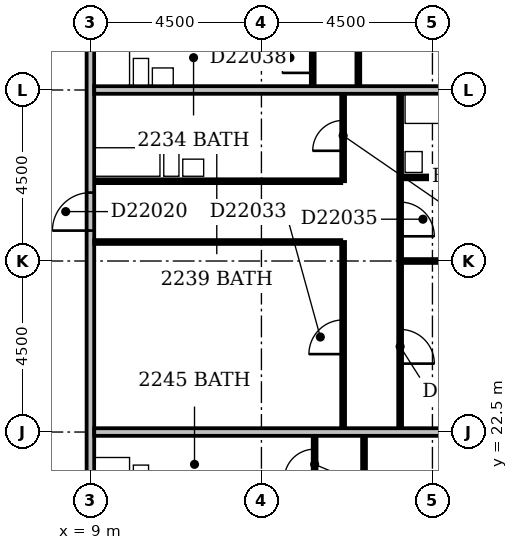
"""IFC4 building model, lengths in metres.
Left out: names, types, materials, properties, quantities, classifications, styles, units other than length and angle.
Written with IfcOpenShell. Run it as: python <this file> out.ifc"""

import sys

from ifc_helpers import new_model, si_unit, direction, frame, frame_2d, origin, place, context, subcontext, project, spatial, rectangle, extrude, element, fill, save


model = new_model("IFC4")
c1 = context("Model", 3, precision=1e-05, world=origin(), true_north=direction((0.0, 1.0)))
c2 = subcontext(c1, "Body", "Model", "MODEL_VIEW")
j1 = project(units=[si_unit("LENGTHUNIT", "METRE"), si_unit("PLANEANGLEUNIT", "RADIAN")], contexts=[c1])
p1 = place(None, origin())
s1 = spatial("IfcSite", under=j1, at=p1, CompositionType="ELEMENT")
p2 = place(p1, origin())
s2 = spatial("IfcBuilding", under=s1, at=p2, CompositionType="ELEMENT")
p3 = place(p2, frame((0.0, 0.0, 90.2)))
s3 = spatial("IfcBuildingStorey", under=s2, at=p3, CompositionType="ELEMENT", Elevation=90.2)
p4 = place(p3, frame((9.0, 5.0, 0.0), z_axis=(0.0, 0.0, 1.0), x_axis=(0.0, 1.0, 0.0)))
e1 = element("IfcWall", 1, at=p4, inside=s3, PredefinedType="PARTITIONING", context=c2, shape_type="SweptSolid", body=[
    extrude(rectangle(XDim=44.5, YDim=0.2, at=frame_2d((22.25, 0.0))), origin(), (0.0, 0.0, 1.0), 3.3),
])
p5 = place(p4, frame((28.45, 0.0, 0.0)))
e2 = element("IfcOpeningElement", 2, at=p5, cuts=e1, PredefinedType="OPENING", context=c2, shape_type="SweptSolid", body=[
    extrude(rectangle(XDim=1.0, YDim=2.1, at=frame_2d((0.5, 1.05))), frame((0.0, 0.112, 0.0), z_axis=(0.0, -1.0, 0.0), x_axis=(1.0, 0.0, 0.0)), (0.0, 0.0, 1.0), 0.224),
])
p6 = place(p4, frame((22.8, 0.0, 0.0)))
e3 = element("IfcOpeningElement", 3, at=p6, cuts=e1, PredefinedType="OPENING", context=c2, shape_type="SweptSolid", body=[
    extrude(rectangle(XDim=1.0, YDim=2.1, at=frame_2d((0.5, 1.05))), frame((0.0, 0.112, 0.0), z_axis=(0.0, -1.0, 0.0), x_axis=(1.0, 0.0, 0.0)), (0.0, 0.0, 1.0), 0.224),
])
p7 = place(p4, frame((14.55, 0.0, 0.0)))
e4 = element("IfcOpeningElement", 4, at=p7, cuts=e1, PredefinedType="OPENING", context=c2, shape_type="SweptSolid", body=[
    extrude(rectangle(XDim=1.0, YDim=2.1, at=frame_2d((0.5, 1.05))), frame((0.0, 0.112, 0.0), z_axis=(0.0, -1.0, 0.0), x_axis=(1.0, 0.0, 0.0)), (0.0, 0.0, 1.0), 0.224),
])
p8 = place(p4, frame((9.3, 0.0, 0.0)))
e5 = element("IfcOpeningElement", 5, at=p8, cuts=e1, PredefinedType="OPENING", context=c2, shape_type="SweptSolid", body=[
    extrude(rectangle(XDim=1.0, YDim=2.1, at=frame_2d((0.5, 1.05))), frame((0.0, 0.112, 0.0), z_axis=(0.0, -1.0, 0.0), x_axis=(1.0, 0.0, 0.0)), (0.0, 0.0, 1.0), 0.224),
])
p9 = place(p4, frame((35.0, 0.0, 0.0)))
e6 = element("IfcOpeningElement", 6, at=p9, cuts=e1, PredefinedType="OPENING", context=c2, shape_type="SweptSolid", body=[
    extrude(rectangle(XDim=0.9, YDim=2.1, at=frame_2d((0.45, 1.05))), frame((0.0, 0.112, 0.0), z_axis=(0.0, -1.0, 0.0), x_axis=(1.0, 0.0, 0.0)), (0.0, 0.0, 1.0), 0.224),
])
p10 = place(p4, frame((1.5, 0.0, 0.0)))
e7 = element("IfcOpeningElement", 7, at=p10, cuts=e1, PredefinedType="OPENING", context=c2, shape_type="SweptSolid", body=[
    extrude(rectangle(XDim=0.9, YDim=2.1, at=frame_2d((0.45, 1.05))), frame((0.0, 0.112, 0.0), z_axis=(0.0, -1.0, 0.0), x_axis=(1.0, 0.0, 0.0)), (0.0, 0.0, 1.0), 0.224),
])
p11 = place(p3, frame((16.2, 18.1, 0.0), z_axis=(0.0, 0.0, 1.0), x_axis=(0.0, 1.0, 0.0)))
e8 = element("IfcWall", 8, at=p11, inside=s3, PredefinedType="PARTITIONING", context=c2, shape_type="SweptSolid", body=[
    extrude(rectangle(XDim=4.3, YDim=0.1, at=frame_2d((2.15, 0.0))), origin(), (0.0, 0.0, 1.0), 3.3),
])
p12 = place(p11, frame((1.7, 0.0, 0.0)))
e9 = element("IfcOpeningElement", 9, at=p12, cuts=e8, PredefinedType="OPENING", context=c2, shape_type="SweptSolid", body=[
    extrude(rectangle(XDim=0.9, YDim=2.1, at=frame_2d((0.45, 1.05))), frame((0.0, 0.062, 0.0), z_axis=(0.0, -1.0, 0.0), x_axis=(1.0, 0.0, 0.0)), (0.0, 0.0, 1.0), 0.124),
])
p13 = place(p3, frame((14.9, 20.8, 0.0), z_axis=(0.0, 0.0, 1.0), x_axis=(0.0, 1.0, 0.0)))
e10 = element("IfcWall", 10, at=p13, inside=s3, PredefinedType="PARTITIONING", context=c2, shape_type="SweptSolid", body=[
    extrude(rectangle(XDim=1.6, YDim=0.1, at=frame_2d((0.8, 0.0))), origin(), (0.0, 0.0, 1.0), 3.3),
])
p14 = place(p13, frame((0.45, 0.0, 0.0)))
e11 = element("IfcOpeningElement", 11, at=p14, cuts=e10, PredefinedType="OPENING", context=c2, shape_type="SweptSolid", body=[
    extrude(rectangle(XDim=0.8, YDim=2.1, at=frame_2d((0.4, 1.05))), frame((0.0, 0.062, 0.0), z_axis=(0.0, -1.0, 0.0), x_axis=(1.0, 0.0, 0.0)), (0.0, 0.0, 1.0), 0.124),
])
p15 = place(p3, frame((9.1, 22.5, 0.0), z_axis=(0.0, 0.0, 1.0), x_axis=(1.0, 0.0, 0.0)))
e12 = element("IfcWall", 12, at=p15, inside=s3, PredefinedType="PARTITIONING", context=c2, shape_type="SweptSolid", body=[
    extrude(rectangle(XDim=12.8, YDim=0.2, at=frame_2d((6.4, 0.0))), origin(), (0.0, 0.0, 1.0), 3.3),
])
p16 = place(p3, frame((15.65, 22.6, 0.0), z_axis=(0.0, 0.0, 1.0), x_axis=(0.0, 1.0, 0.0)))
e13 = element("IfcWall", 13, at=p16, inside=s3, PredefinedType="PARTITIONING", context=c2, shape_type="SweptSolid", body=[
    extrude(rectangle(XDim=4.9, YDim=0.1, at=frame_2d((2.45, 0.0))), origin(), (0.0, 0.0, 1.0), 3.3),
])
p17 = place(p16, frame((1.95, 0.0, 0.0)))
e14 = element("IfcOpeningElement", 14, at=p17, cuts=e13, PredefinedType="OPENING", context=c2, shape_type="SweptSolid", body=[
    extrude(rectangle(XDim=0.9, YDim=2.1, at=frame_2d((0.45, 1.05))), frame((0.0, 0.062, 0.0), z_axis=(0.0, -1.0, 0.0), x_axis=(1.0, 0.0, 0.0)), (0.0, 0.0, 1.0), 0.124),
])
p18 = place(p3, frame((17.15, 22.6, 0.0), z_axis=(0.0, 0.0, 1.0), x_axis=(0.0, 1.0, 0.0)))
e15 = element("IfcWall", 15, at=p18, inside=s3, PredefinedType="PARTITIONING", context=c2, shape_type="SweptSolid", body=[
    extrude(rectangle(XDim=8.8, YDim=0.1, at=frame_2d((4.4, 0.0))), origin(), (0.0, 0.0, 1.0), 3.3),
])
p19 = place(p18, frame((1.7, 0.0, 0.0)))
e16 = element("IfcOpeningElement", 16, at=p19, cuts=e15, PredefinedType="OPENING", context=c2, shape_type="SweptSolid", body=[
    extrude(rectangle(XDim=0.9, YDim=2.1, at=frame_2d((0.45, 1.05))), frame((0.0, 0.062, 0.0), z_axis=(0.0, -1.0, 0.0), x_axis=(1.0, 0.0, 0.0)), (0.0, 0.0, 1.0), 0.124),
])
p20 = place(p18, frame((5.05, 0.0, 0.0)))
e17 = element("IfcOpeningElement", 17, at=p20, cuts=e15, PredefinedType="OPENING", context=c2, shape_type="SweptSolid", body=[
    extrude(rectangle(XDim=0.9, YDim=2.1, at=frame_2d((0.45, 1.05))), frame((0.0, 0.062, 0.0), z_axis=(0.0, -1.0, 0.0), x_axis=(1.0, 0.0, 0.0)), (0.0, 0.0, 1.0), 0.124),
])
p21 = place(p3, frame((17.2, 27.0, 0.0), z_axis=(0.0, 0.0, 1.0), x_axis=(1.0, 0.0, 0.0)))
e18 = element("IfcWall", 18, at=p21, inside=s3, PredefinedType="PARTITIONING", context=c2, shape_type="SweptSolid", body=[
    extrude(rectangle(XDim=4.7, YDim=0.1, at=frame_2d((2.35, 0.0))), origin(), (0.0, 0.0, 1.0), 2.7),
])
p22 = place(p3, frame((9.1, 27.5, 0.0), z_axis=(0.0, 0.0, 1.0), x_axis=(1.0, 0.0, 0.0)))
e19 = element("IfcWall", 19, at=p22, inside=s3, PredefinedType="PARTITIONING", context=c2, shape_type="SweptSolid", body=[
    extrude(rectangle(XDim=6.5, YDim=0.1, at=frame_2d((3.25, 0.0))), origin(), (0.0, 0.0, 1.0), 2.7),
])
p23 = place(p3, frame((9.1, 29.1, 0.0), z_axis=(0.0, 0.0, 1.0), x_axis=(1.0, 0.0, 0.0)))
e20 = element("IfcWall", 20, at=p23, inside=s3, PredefinedType="PLUMBINGWALL", context=c2, shape_type="SweptSolid", body=[
    extrude(rectangle(XDim=6.5, YDim=0.1, at=frame_2d((3.25, 0.0))), origin(), (0.0, 0.0, 1.0), 3.3),
])
p24 = place(p3, frame((15.65, 29.1, 0.0), z_axis=(0.0, 0.0, 1.0), x_axis=(0.0, 1.0, 0.0)))
e21 = element("IfcWall", 21, at=p24, inside=s3, PredefinedType="PARTITIONING", context=c2, shape_type="SweptSolid", body=[
    extrude(rectangle(XDim=2.3, YDim=0.1, at=frame_2d((1.15, 0.0))), origin(), (0.0, 0.0, 1.0), 3.3),
])
p25 = place(p24, frame((0.8, 0.0, 0.0)))
e22 = element("IfcOpeningElement", 22, at=p25, cuts=e21, PredefinedType="OPENING", context=c2, shape_type="SweptSolid", body=[
    extrude(rectangle(XDim=0.8, YDim=2.1, at=frame_2d((0.4, 1.05))), frame((0.0, 0.062, 0.0), z_axis=(0.0, -1.0, 0.0), x_axis=(1.0, 0.0, 0.0)), (0.0, 0.0, 1.0), 0.124),
])
p26 = place(p3, frame((17.2, 29.2, 0.0), z_axis=(0.0, 0.0, 1.0), x_axis=(1.0, 0.0, 0.0)))
e23 = element("IfcWall", 23, at=p26, inside=s3, PredefinedType="PLUMBINGWALL", context=c2, shape_type="SweptSolid", body=[
    extrude(rectangle(XDim=2.8, YDim=0.1, at=frame_2d((1.4, 0.0))), origin(), (0.0, 0.0, 1.0), 3.3),
])
p27 = place(p26, frame((1.0, 0.0, 0.0)))
e24 = element("IfcOpeningElement", 24, at=p27, cuts=e23, PredefinedType="OPENING", context=c2, shape_type="SweptSolid", body=[
    extrude(rectangle(XDim=0.8, YDim=2.1, at=frame_2d((0.4, 1.05))), frame((0.0, 0.062, 0.0), z_axis=(0.0, -1.0, 0.0), x_axis=(1.0, 0.0, 0.0)), (0.0, 0.0, 1.0), 0.124),
])
p28 = place(p3, frame((9.1, 31.5, 0.0), z_axis=(0.0, 0.0, 1.0), x_axis=(1.0, 0.0, 0.0)))
e25 = element("IfcWall", 25, at=p28, inside=s3, PredefinedType="PARTITIONING", context=c2, shape_type="SweptSolid", body=[
    extrude(rectangle(XDim=12.8, YDim=0.2, at=frame_2d((6.4, 0.0))), origin(), (0.0, 0.0, 1.0), 3.3),
])
p29 = place(p3, frame((14.85, 31.6, 0.0), z_axis=(0.0, 0.0, 1.0), x_axis=(0.0, 1.0, 0.0)))
e26 = element("IfcWall", 26, at=p29, inside=s3, PredefinedType="PARTITIONING", context=c2, shape_type="SweptSolid", body=[
    extrude(rectangle(XDim=1.6, YDim=0.1, at=frame_2d((0.8, 0.0))), origin(), (0.0, 0.0, 1.0), 3.3),
])
p30 = place(p29, frame((0.35, 0.0, 0.0)))
e27 = element("IfcOpeningElement", 27, at=p30, cuts=e26, PredefinedType="OPENING", context=c2, shape_type="SweptSolid", body=[
    extrude(rectangle(XDim=0.8, YDim=2.1, at=frame_2d((0.4, 1.05))), frame((0.0, 0.062, 0.0), z_axis=(0.0, -1.0, 0.0), x_axis=(1.0, 0.0, 0.0)), (0.0, 0.0, 1.0), 0.124),
])
p31 = place(p3, frame((16.05, 31.6, 0.0), z_axis=(0.0, 0.0, 1.0), x_axis=(0.0, 1.0, 0.0)))
e28 = element("IfcWall", 28, at=p31, inside=s3, PredefinedType="PARTITIONING", context=c2, shape_type="SweptSolid", body=[
    extrude(rectangle(XDim=4.3, YDim=0.1, at=frame_2d((2.15, 0.0))), origin(), (0.0, 0.0, 1.0), 3.3),
])
p32 = place(p31, frame((1.7, 0.0, 0.0)))
e29 = element("IfcOpeningElement", 29, at=p32, cuts=e28, PredefinedType="OPENING", context=c2, shape_type="SweptSolid", body=[
    extrude(rectangle(XDim=0.9, YDim=2.1, at=frame_2d((0.45, 1.05))), frame((0.0, 0.062, 0.0), z_axis=(0.0, -1.0, 0.0), x_axis=(1.0, 0.0, 0.0)), (0.0, 0.0, 1.0), 0.124),
])
p33 = place(p6, origin())
e30 = element("IfcDoor", 30, at=p33, inside=s3, OperationType="SINGLE_SWING_LEFT", PredefinedType="DOOR", context=c2, shape_type="SweptSolid", body=[
    extrude(rectangle(XDim=1.0, YDim=2.1, at=frame_2d((0.5, 1.05))), frame((0.0, 0.025, 0.0), z_axis=(0.0, -1.0, 0.0), x_axis=(1.0, 0.0, 0.0)), (0.0, 0.0, 1.0), 0.05),
])
fill(e3, e30)
p34 = place(p14, origin())
e31 = element("IfcDoor", 31, at=p34, inside=s3, OperationType="SINGLE_SWING_LEFT", PredefinedType="DOOR", context=c2, shape_type="SweptSolid", body=[
    extrude(rectangle(XDim=0.8, YDim=2.1, at=frame_2d((0.4, 1.05))), frame((0.0, 0.025, 0.0), z_axis=(0.0, -1.0, 0.0), x_axis=(1.0, 0.0, 0.0)), (0.0, 0.0, 1.0), 0.05),
])
fill(e11, e31)
p35 = place(p17, origin())
e32 = element("IfcDoor", 32, at=p35, inside=s3, OperationType="SINGLE_SWING_LEFT", PredefinedType="DOOR", context=c2, shape_type="SweptSolid", body=[
    extrude(rectangle(XDim=0.9, YDim=2.1, at=frame_2d((0.45, 1.05))), frame((0.0, 0.025, 0.0), z_axis=(0.0, -1.0, 0.0), x_axis=(1.0, 0.0, 0.0)), (0.0, 0.0, 1.0), 0.05),
])
fill(e14, e32)
p36 = place(p19, frame((0.9, 0.0, 0.0), z_axis=(0.0, 0.0, 1.0), x_axis=(-1.0, 0.0, 0.0)))
e33 = element("IfcDoor", 33, at=p36, inside=s3, OperationType="SINGLE_SWING_RIGHT", PredefinedType="DOOR", context=c2, shape_type="SweptSolid", body=[
    extrude(rectangle(XDim=0.9, YDim=2.1, at=frame_2d((0.45, 1.05))), frame((0.0, 0.025, 0.0), z_axis=(0.0, -1.0, 0.0), x_axis=(1.0, 0.0, 0.0)), (0.0, 0.0, 1.0), 0.05),
])
fill(e16, e33)
p37 = place(p20, frame((0.9, 0.0, 0.0), z_axis=(0.0, 0.0, 1.0), x_axis=(-1.0, 0.0, 0.0)))
e34 = element("IfcDoor", 34, at=p37, inside=s3, OperationType="SINGLE_SWING_RIGHT", PredefinedType="DOOR", context=c2, shape_type="SweptSolid", body=[
    extrude(rectangle(XDim=0.9, YDim=2.1, at=frame_2d((0.45, 1.05))), frame((0.0, 0.025, 0.0), z_axis=(0.0, -1.0, 0.0), x_axis=(1.0, 0.0, 0.0)), (0.0, 0.0, 1.0), 0.05),
])
fill(e17, e34)
p38 = place(p25, origin())
e35 = element("IfcDoor", 35, at=p38, inside=s3, OperationType="SINGLE_SWING_LEFT", PredefinedType="DOOR", context=c2, shape_type="SweptSolid", body=[
    extrude(rectangle(XDim=0.8, YDim=2.1, at=frame_2d((0.4, 1.05))), frame((0.0, 0.025, 0.0), z_axis=(0.0, -1.0, 0.0), x_axis=(1.0, 0.0, 0.0)), (0.0, 0.0, 1.0), 0.05),
])
fill(e22, e35)
p39 = place(p30, origin())
e36 = element("IfcDoor", 36, at=p39, inside=s3, OperationType="SINGLE_SWING_LEFT", PredefinedType="DOOR", context=c2, shape_type="SweptSolid", body=[
    extrude(rectangle(XDim=0.8, YDim=2.1, at=frame_2d((0.4, 1.05))), frame((0.0, 0.025, 0.0), z_axis=(0.0, -1.0, 0.0), x_axis=(1.0, 0.0, 0.0)), (0.0, 0.0, 1.0), 0.05),
])
fill(e27, e36)
save(model, sys.argv[1])
